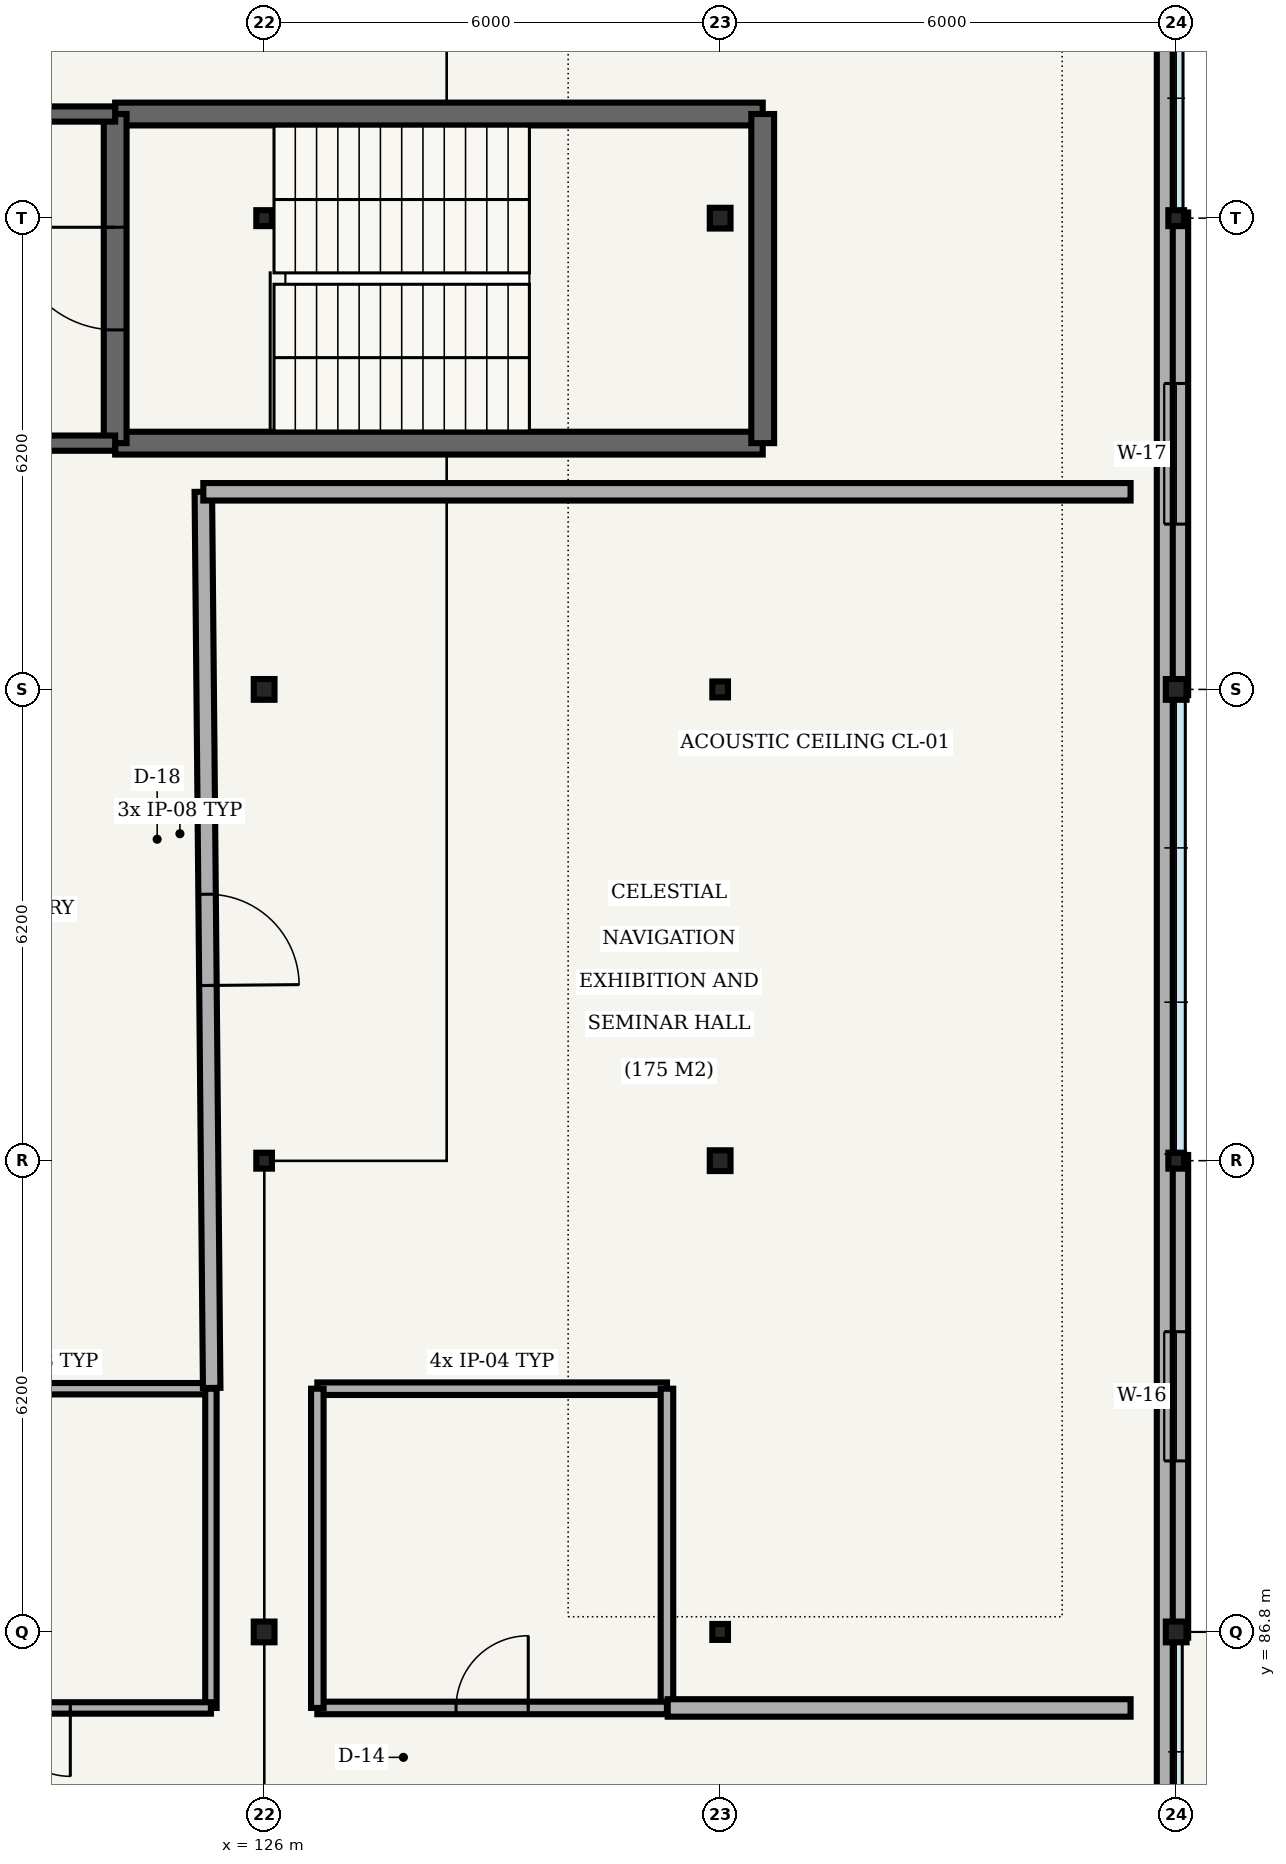
"""IFC4 building model, lengths in metres.
Left out: names, types, materials, properties, quantities, classifications, styles, units other than length and angle.
Written with IfcOpenShell. Run it as: python <this file> out.ifc"""

import sys

from ifc_helpers import new_model, si_unit, direction, frame, frame_2d, origin, origin_2d, place, context, subcontext, project, spatial, rectangle, hollow_circle, i_section, extrude, element, fill, save


model = new_model("IFC4")
c1 = context("Model", 3, precision=1e-05, world=origin(), true_north=direction((0.0, 1.0)))
c2 = subcontext(c1, "Body", "Model", "MODEL_VIEW")
j1 = project(units=[si_unit("LENGTHUNIT", "METRE"), si_unit("PLANEANGLEUNIT", "RADIAN")], contexts=[c1])
p1 = place(None, origin())
s1 = spatial("IfcSite", under=j1, at=p1, CompositionType="ELEMENT")
p2 = place(p1, origin())
s2 = spatial("IfcBuilding", under=s1, at=p2, CompositionType="ELEMENT")
p3 = place(p2, frame((0.0, 0.0, 25.2)))
s3 = spatial("IfcBuildingStorey", under=s2, at=p3, CompositionType="ELEMENT", Elevation=25.2)
p4 = place(p3, frame((126.0, 86.8, 0.0), z_axis=(0.0, 0.0, 1.0), x_axis=(1.0, 0.0, 0.0)))
e1 = element("IfcColumn", 1, at=p4, inside=s3, PredefinedType="COLUMN", context=c2, shape_type="SweptSolid", body=[
    extrude(hollow_circle(Radius=0.136, WallThickness=0.01, at=origin_2d()), origin(), (0.0, 0.0, 1.0), 4.41),
])
p5 = place(p3, frame((126.0, 93.0, 0.0), z_axis=(0.0, 0.0, 1.0), x_axis=(1.0, 0.0, 0.0)))
e2 = element("IfcColumn", 2, at=p5, inside=s3, PredefinedType="COLUMN", context=c2, shape_type="SweptSolid", body=[
    extrude(i_section(OverallWidth=0.206, OverallDepth=0.21, WebThickness=0.01, FlangeThickness=0.014, FilletRadius=0.01, at=origin_2d()), origin(), (0.0, 0.0, 1.0), 4.41),
])
p6 = place(p3, frame((126.0, 99.2, 0.0), z_axis=(0.0, 0.0, 1.0), x_axis=(1.0, 0.0, 0.0)))
e3 = element("IfcColumn", 3, at=p6, inside=s3, PredefinedType="COLUMN", context=c2, shape_type="SweptSolid", body=[
    extrude(hollow_circle(Radius=0.136, WallThickness=0.01, at=origin_2d()), origin(), (0.0, 0.0, 1.0), 4.41),
])
for number, where, z_axis, x_axis in (
    (4, (126.0, 105.4, 0.0), (0.0, 0.0, 1.0), (1.0, 0.0, 0.0)),
    (5, (132.0, 86.8, 0.0), (0.0, 0.0, 1.0), (1.0, 0.0, 0.0)),
):
    element("IfcColumn", number, at=place(p3, frame(where, z_axis=z_axis, x_axis=x_axis)), inside=s3, PredefinedType="COLUMN", context=c2, shape_type="SweptSolid", body=[
        extrude(i_section(OverallWidth=0.206, OverallDepth=0.21, WebThickness=0.01, FlangeThickness=0.014, FilletRadius=0.01, at=origin_2d()), origin(), (0.0, 0.0, 1.0), 4.41),
    ])
p7 = place(p3, frame((132.0, 93.0, 0.0), z_axis=(0.0, 0.0, 1.0), x_axis=(1.0, 0.0, 0.0)))
e6 = element("IfcColumn", 6, at=p7, inside=s3, PredefinedType="COLUMN", context=c2, shape_type="SweptSolid", body=[
    extrude(hollow_circle(Radius=0.136, WallThickness=0.01, at=origin_2d()), origin(), (0.0, 0.0, 1.0), 4.41),
])
p8 = place(p3, frame((132.0, 99.2, 0.0), z_axis=(0.0, 0.0, 1.0), x_axis=(1.0, 0.0, 0.0)))
e7 = element("IfcColumn", 7, at=p8, inside=s3, PredefinedType="COLUMN", context=c2, shape_type="SweptSolid", body=[
    extrude(i_section(OverallWidth=0.206, OverallDepth=0.21, WebThickness=0.01, FlangeThickness=0.014, FilletRadius=0.01, at=origin_2d()), origin(), (0.0, 0.0, 1.0), 4.41),
])
for number, where, z_axis, x_axis in (
    (8, (132.0, 105.4, 0.0), (0.0, 0.0, 1.0), (1.0, 0.0, 0.0)),
    (9, (138.0, 86.8, 0.0), (0.0, 0.0, 1.0), (1.0, 0.0, 0.0)),
):
    element("IfcColumn", number, at=place(p3, frame(where, z_axis=z_axis, x_axis=x_axis)), inside=s3, PredefinedType="COLUMN", context=c2, shape_type="SweptSolid", body=[
        extrude(hollow_circle(Radius=0.136, WallThickness=0.01, at=origin_2d()), origin(), (0.0, 0.0, 1.0), 4.41),
    ])
p9 = place(p3, frame((138.0, 93.0, 0.0), z_axis=(0.0, 0.0, 1.0), x_axis=(1.0, 0.0, 0.0)))
e10 = element("IfcColumn", 10, at=p9, inside=s3, PredefinedType="COLUMN", context=c2, shape_type="SweptSolid", body=[
    extrude(i_section(OverallWidth=0.206, OverallDepth=0.21, WebThickness=0.01, FlangeThickness=0.014, FilletRadius=0.01, at=origin_2d()), origin(), (0.0, 0.0, 1.0), 4.41),
])
p10 = place(p3, frame((138.0, 99.2, 0.0), z_axis=(0.0, 0.0, 1.0), x_axis=(1.0, 0.0, 0.0)))
e11 = element("IfcColumn", 11, at=p10, inside=s3, PredefinedType="COLUMN", context=c2, shape_type="SweptSolid", body=[
    extrude(hollow_circle(Radius=0.136, WallThickness=0.01, at=origin_2d()), origin(), (0.0, 0.0, 1.0), 4.41),
])
p11 = place(p3, frame((138.0, 105.4, 0.0), z_axis=(0.0, 0.0, 1.0), x_axis=(1.0, 0.0, 0.0)))
e12 = element("IfcColumn", 12, at=p11, inside=s3, PredefinedType="COLUMN", context=c2, shape_type="SweptSolid", body=[
    extrude(i_section(OverallWidth=0.206, OverallDepth=0.21, WebThickness=0.01, FlangeThickness=0.014, FilletRadius=0.01, at=origin_2d()), origin(), (0.0, 0.0, 1.0), 4.41),
])
p12 = place(p3, frame((138.0, 86.725, 0.0), z_axis=(0.0, 0.0, 1.0), x_axis=(0.0, 1.0, 0.0)))
e13 = element("IfcWall", 13, at=p12, inside=s3, PredefinedType="SOLIDWALL", context=c2, shape_type="SweptSolid", body=[
    extrude(rectangle(XDim=6.35, YDim=0.315, at=frame_2d((3.175, 0.0))), origin(), (0.0, 0.0, 1.0), 3.92),
])
p13 = place(p12, frame((2.325, 0.0, 0.9)))
e14 = element("IfcOpeningElement", 14, at=p13, cuts=e13, PredefinedType="OPENING", context=c2, shape_type="SweptSolid", body=[
    extrude(rectangle(XDim=1.7, YDim=1.5, at=frame_2d((0.85, 0.75))), frame((0.0, 0.167, 0.0), z_axis=(0.0, -1.0, 0.0), x_axis=(1.0, 0.0, 0.0)), (0.0, 0.0, 1.0), 0.335),
])
p14 = place(p3, frame((138.0, 99.125, 0.0), z_axis=(0.0, 0.0, 1.0), x_axis=(0.0, 1.0, 0.0)))
e15 = element("IfcWall", 15, at=p14, inside=s3, PredefinedType="SOLIDWALL", context=c2, shape_type="SweptSolid", body=[
    extrude(rectangle(XDim=6.35, YDim=0.315, at=frame_2d((3.175, 0.0))), origin(), (0.0, 0.0, 1.0), 3.92),
])
p15 = place(p14, frame((2.25, 0.0, 0.9)))
e16 = element("IfcOpeningElement", 16, at=p15, cuts=e15, PredefinedType="OPENING", context=c2, shape_type="SweptSolid", body=[
    extrude(rectangle(XDim=1.85, YDim=1.5, at=frame_2d((0.925, 0.75))), frame((0.0, 0.167, 0.0), z_axis=(0.0, -1.0, 0.0), x_axis=(1.0, 0.0, 0.0)), (0.0, 0.0, 1.0), 0.335),
])
p16 = place(p3, frame((137.85, 74.55, 4.6), z_axis=(0.0, 0.0, 1.0), x_axis=(0.0, 1.0, 0.0)))
e17 = element("IfcWall", 17, at=p16, inside=s3, PredefinedType="PARAPET", context=c2, shape_type="SweptSolid", body=[
    extrude(rectangle(XDim=36.9, YDim=0.21, at=frame_2d((18.45, 0.0))), origin(), (0.0, 0.0, 1.0), 0.9),
])
for number, where, z_axis, x_axis in (
    (18, (124.04, 102.44, 0.0), (0.0, 0.0, 1.0), (1.0, 0.0, 0.0)),
    (19, (132.56, 106.77, 0.0), (0.0, 0.0, 1.0), (-1.0, 0.0, 0.0)),
):
    element("IfcWall", number, at=place(p3, frame(where, z_axis=z_axis, x_axis=x_axis)), inside=s3, PredefinedType="SHEAR", context=c2, shape_type="SweptSolid", body=[
        extrude(rectangle(XDim=8.52, YDim=0.3, at=frame_2d((4.26, 0.0))), origin(), (0.0, 0.0, 1.0), 3.85),
    ])
p17 = place(p3, frame((124.04, 106.77, 0.0), z_axis=(0.0, 0.0, 1.0), x_axis=(0.0, -1.0, 0.0)))
e20 = element("IfcWall", 20, at=p17, inside=s3, PredefinedType="SHEAR", context=c2, shape_type="SweptSolid", body=[
    extrude(rectangle(XDim=4.33, YDim=0.3, at=frame_2d((2.165, 0.0))), origin(), (0.0, 0.0, 1.0), 3.85),
])
p18 = place(p17, frame((1.49, 0.0, 0.0)))
e21 = element("IfcOpeningElement", 21, at=p18, cuts=e20, PredefinedType="OPENING", context=c2, shape_type="SweptSolid", body=[
    extrude(rectangle(XDim=1.35, YDim=2.2, at=frame_2d((0.675, 1.1))), frame((0.0, 0.16, 0.0), z_axis=(0.0, -1.0, 0.0), x_axis=(1.0, 0.0, 0.0)), (0.0, 0.0, 1.0), 0.32),
])
p19 = place(p3, frame((132.56, 102.44, 0.0), z_axis=(0.0, 0.0, 1.0), x_axis=(0.0, 1.0, 0.0)))
e22 = element("IfcWall", 22, at=p19, inside=s3, PredefinedType="SHEAR", context=c2, shape_type="SweptSolid", body=[
    extrude(rectangle(XDim=4.33, YDim=0.3, at=frame_2d((2.165, 0.0))), origin(), (0.0, 0.0, 1.0), 3.85),
])
p20 = place(p3, frame((120.7, 102.44, 0.0), z_axis=(0.0, 0.0, 1.0), x_axis=(1.0, 0.0, 0.0)))
e23 = element("IfcWall", 23, at=p20, inside=s3, PredefinedType="SHEAR", context=c2, shape_type="SweptSolid", body=[
    extrude(rectangle(XDim=3.34, YDim=0.2, at=frame_2d((1.67, 0.0))), origin(), (0.0, 0.0, 1.0), 3.85),
])
p21 = place(p20, frame((0.895, 0.0, 0.0)))
e24 = element("IfcOpeningElement", 24, at=p21, cuts=e23, PredefinedType="OPENING", context=c2, shape_type="SweptSolid", body=[
    extrude(rectangle(XDim=1.55, YDim=2.2, at=frame_2d((0.775, 1.1))), frame((0.0, 0.11, 0.0), z_axis=(0.0, -1.0, 0.0), x_axis=(1.0, 0.0, 0.0)), (0.0, 0.0, 1.0), 0.22),
])
p22 = place(p3, frame((124.04, 106.77, 0.0), z_axis=(0.0, 0.0, 1.0), x_axis=(-1.0, 0.0, 0.0)))
e25 = element("IfcWall", 25, at=p22, inside=s3, PredefinedType="SHEAR", context=c2, shape_type="SweptSolid", body=[
    extrude(rectangle(XDim=3.34, YDim=0.2, at=frame_2d((1.67, 0.0))), origin(), (0.0, 0.0, 1.0), 3.85),
])
p23 = place(p3, frame((120.7, 90.0, 0.0), z_axis=(0.0, 0.0, 1.0), x_axis=(1.0, 0.0, 0.0)))
e26 = element("IfcWall", 26, at=p23, inside=s3, PredefinedType="PARTITIONING", context=c2, shape_type="SweptSolid", body=[
    extrude(rectangle(XDim=4.6, YDim=0.15, at=frame_2d((2.3, 0.0))), origin(), (0.0, 0.0, 1.0), 3.85),
])
p24 = place(p3, frame((125.3, 90.0, 0.0), z_axis=(0.0, 0.0, 1.0), x_axis=(0.0, -1.0, 0.0)))
e27 = element("IfcWall", 27, at=p24, inside=s3, PredefinedType="PARTITIONING", context=c2, shape_type="SweptSolid", body=[
    extrude(rectangle(XDim=4.2, YDim=0.15, at=frame_2d((2.1, 0.0))), origin(), (0.0, 0.0, 1.0), 3.85),
])
p25 = place(p3, frame((125.3, 85.8, 0.0), z_axis=(0.0, 0.0, 1.0), x_axis=(-1.0, 0.0, 0.0)))
e28 = element("IfcWall", 28, at=p25, inside=s3, PredefinedType="PARTITIONING", context=c2, shape_type="SweptSolid", body=[
    extrude(rectangle(XDim=4.6, YDim=0.15, at=frame_2d((2.3, 0.0))), origin(), (0.0, 0.0, 1.0), 3.85),
])
p26 = place(p25, frame((1.85, 0.0, 0.0)))
e29 = element("IfcOpeningElement", 29, at=p26, cuts=e28, PredefinedType="OPENING", context=c2, shape_type="SweptSolid", body=[
    extrude(rectangle(XDim=0.9, YDim=2.25, at=frame_2d((0.45, 1.125))), frame((0.0, 0.085, 0.0), z_axis=(0.0, -1.0, 0.0), x_axis=(1.0, 0.0, 0.0)), (0.0, 0.0, 1.0), 0.17),
])
p27 = place(p3, frame((126.7, 90.0, 0.0), z_axis=(0.0, 0.0, 1.0), x_axis=(1.0, 0.0, 0.0)))
e30 = element("IfcWall", 30, at=p27, inside=s3, PredefinedType="PARTITIONING", context=c2, shape_type="SweptSolid", body=[
    extrude(rectangle(XDim=4.6, YDim=0.165, at=frame_2d((2.3, 0.0))), origin(), (0.0, 0.0, 1.0), 3.85),
])
p28 = place(p3, frame((131.3, 90.0, 0.0), z_axis=(0.0, 0.0, 1.0), x_axis=(0.0, -1.0, 0.0)))
e31 = element("IfcWall", 31, at=p28, inside=s3, PredefinedType="PARTITIONING", context=c2, shape_type="SweptSolid", body=[
    extrude(rectangle(XDim=4.2, YDim=0.165, at=frame_2d((2.1, 0.0))), origin(), (0.0, 0.0, 1.0), 3.85),
])
p29 = place(p3, frame((131.3, 85.8, 0.0), z_axis=(0.0, 0.0, 1.0), x_axis=(-1.0, 0.0, 0.0)))
e32 = element("IfcWall", 32, at=p29, inside=s3, PredefinedType="PARTITIONING", context=c2, shape_type="SweptSolid", body=[
    extrude(rectangle(XDim=4.6, YDim=0.165, at=frame_2d((2.3, 0.0))), origin(), (0.0, 0.0, 1.0), 3.85),
])
p30 = place(p29, frame((1.825, 0.0, 0.0)))
e33 = element("IfcOpeningElement", 33, at=p30, cuts=e32, PredefinedType="OPENING", context=c2, shape_type="SweptSolid", body=[
    extrude(rectangle(XDim=0.95, YDim=2.25, at=frame_2d((0.475, 1.125))), frame((0.0, 0.093, 0.0), z_axis=(0.0, -1.0, 0.0), x_axis=(1.0, 0.0, 0.0)), (0.0, 0.0, 1.0), 0.185),
])
p31 = place(p3, frame((126.7, 85.8, 0.0), z_axis=(0.0, 0.0, 1.0), x_axis=(0.0, 1.0, 0.0)))
e34 = element("IfcWall", 34, at=p31, inside=s3, PredefinedType="PARTITIONING", context=c2, shape_type="SweptSolid", body=[
    extrude(rectangle(XDim=4.2, YDim=0.165, at=frame_2d((2.1, 0.0))), origin(), (0.0, 0.0, 1.0), 3.85),
])
p32 = place(p3, frame((125.31, 90.01, 0.0), z_axis=(0.0, 0.0, 1.0), x_axis=(-0.00933861372, 0.999956394196, 0.0)))
e35 = element("IfcWall", 35, at=p32, inside=s3, PredefinedType="PARTITIONING", context=c2, shape_type="SweptSolid", body=[
    extrude(rectangle(XDim=11.791, YDim=0.23, at=frame_2d((5.895, 0.0))), origin(), (0.0, 0.0, 1.0), 3.85),
])
p33 = place(p32, frame((5.295, 0.0, 0.0)))
e36 = element("IfcOpeningElement", 36, at=p33, cuts=e35, PredefinedType="OPENING", context=c2, shape_type="SweptSolid", body=[
    extrude(rectangle(XDim=1.2, YDim=2.25, at=frame_2d((0.6, 1.125))), frame((0.0, 0.125, 0.0), z_axis=(0.0, -1.0, 0.0), x_axis=(1.0, 0.0, 0.0)), (0.0, 0.0, 1.0), 0.25),
])
p34 = place(p3, frame((125.2, 101.8, 0.0), z_axis=(0.0, 0.0, 1.0), x_axis=(1.0, 0.0, 0.0)))
e37 = element("IfcWall", 37, at=p34, inside=s3, PredefinedType="PARTITIONING", context=c2, shape_type="SweptSolid", body=[
    extrude(rectangle(XDim=12.2, YDim=0.23, at=frame_2d((6.1, 0.0))), origin(), (0.0, 0.0, 1.0), 3.85),
])
p35 = place(p3, frame((137.4, 85.8, 0.0), z_axis=(0.0, 0.0, 1.0), x_axis=(-1.0, 0.0, 0.0)))
e38 = element("IfcWall", 38, at=p35, inside=s3, PredefinedType="PARTITIONING", context=c2, shape_type="SweptSolid", body=[
    extrude(rectangle(XDim=6.09, YDim=0.23, at=frame_2d((3.045, 0.0))), origin(), (0.0, 0.0, 1.0), 3.85),
])
p36 = place(p13, origin())
e39 = element("IfcWindow", 39, at=p36, inside=s3, PartitioningType="SINGLE_PANEL", PredefinedType="WINDOW", context=c2, shape_type="SweptSolid", body=[
    extrude(rectangle(XDim=1.7, YDim=1.5, at=frame_2d((0.85, 0.75))), frame((0.0, 0.03, 0.0), z_axis=(0.0, -1.0, 0.0), x_axis=(1.0, 0.0, 0.0)), (0.0, 0.0, 1.0), 0.06),
])
fill(e14, e39)
p37 = place(p15, origin())
e40 = element("IfcWindow", 40, at=p37, inside=s3, PartitioningType="DOUBLE_PANEL_VERTICAL", PredefinedType="WINDOW", context=c2, shape_type="SweptSolid", body=[
    extrude(rectangle(XDim=1.85, YDim=1.5, at=frame_2d((0.925, 0.75))), frame((0.0, 0.03, 0.0), z_axis=(0.0, -1.0, 0.0), x_axis=(1.0, 0.0, 0.0)), (0.0, 0.0, 1.0), 0.06),
])
fill(e16, e40)
p38 = place(p18, origin())
e41 = element("IfcDoor", 41, at=p38, inside=s3, OperationType="SINGLE_SWING_RIGHT", PredefinedType="DOOR", context=c2, shape_type="SweptSolid", body=[
    extrude(rectangle(XDim=1.35, YDim=2.2, at=frame_2d((0.675, 1.1))), frame((0.0, 0.025, 0.0), z_axis=(0.0, -1.0, 0.0), x_axis=(1.0, 0.0, 0.0)), (0.0, 0.0, 1.0), 0.05),
])
fill(e21, e41)
p39 = place(p26, origin())
e42 = element("IfcDoor", 42, at=p39, inside=s3, OperationType="SINGLE_SWING_LEFT", PredefinedType="DOOR", context=c2, shape_type="SweptSolid", body=[
    extrude(rectangle(XDim=0.9, YDim=2.25, at=frame_2d((0.45, 1.125))), frame((0.0, 0.025, 0.0), z_axis=(0.0, -1.0, 0.0), x_axis=(1.0, 0.0, 0.0)), (0.0, 0.0, 1.0), 0.05),
])
fill(e29, e42)
p40 = place(p30, origin())
e43 = element("IfcDoor", 43, at=p40, inside=s3, OperationType="SINGLE_SWING_RIGHT", PredefinedType="DOOR", context=c2, shape_type="SweptSolid", body=[
    extrude(rectangle(XDim=0.95, YDim=2.25, at=frame_2d((0.475, 1.125))), frame((0.0, 0.025, 0.0), z_axis=(0.0, -1.0, 0.0), x_axis=(1.0, 0.0, 0.0)), (0.0, 0.0, 1.0), 0.05),
])
fill(e33, e43)
p41 = place(p33, origin())
e44 = element("IfcDoor", 44, at=p41, inside=s3, OperationType="SINGLE_SWING_RIGHT", PredefinedType="DOOR", context=c2, shape_type="SweptSolid", body=[
    extrude(rectangle(XDim=1.2, YDim=2.25, at=frame_2d((0.6, 1.125))), frame((0.0, 0.025, 0.0), z_axis=(0.0, -1.0, 0.0), x_axis=(1.0, 0.0, 0.0)), (0.0, 0.0, 1.0), 0.05),
])
fill(e36, e44)
save(model, sys.argv[1])
